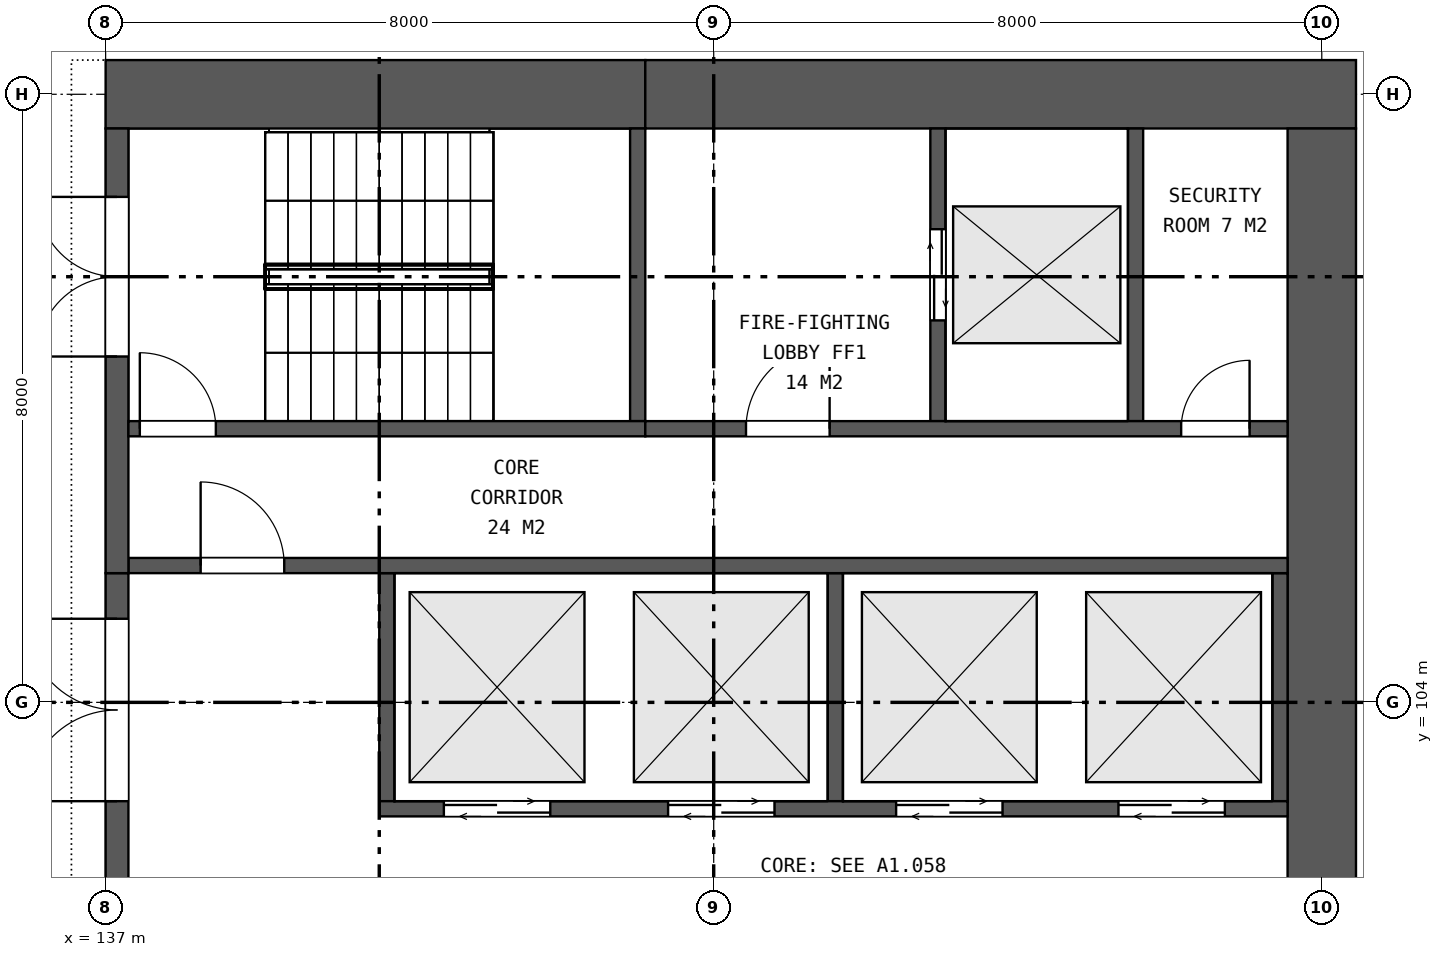
"""IFC4 building model, lengths in metres.
Left out: names, types, materials, properties, quantities, classifications, styles, units other than length and angle.
Written with IfcOpenShell. Run it as: python <this file> out.ifc"""

import sys

from ifc_helpers import new_model, si_unit, direction, frame, frame_2d, origin, place, context, subcontext, project, spatial, rectangle, extrude, element, fill, save


model = new_model("IFC4")
c1 = context("Model", 3, precision=1e-05, world=origin(), true_north=direction((0.0, 1.0)))
c2 = subcontext(c1, "Body", "Model", "MODEL_VIEW")
j1 = project(units=[si_unit("LENGTHUNIT", "METRE"), si_unit("PLANEANGLEUNIT", "RADIAN")], contexts=[c1])
p1 = place(None, origin())
s1 = spatial("IfcSite", under=j1, at=p1, CompositionType="ELEMENT")
p2 = place(p1, origin())
s2 = spatial("IfcBuilding", under=s1, at=p2, CompositionType="ELEMENT")
p3 = place(p2, origin())
s3 = spatial("IfcBuildingStorey", under=s2, at=p3, CompositionType="ELEMENT", Elevation=0.0)
p4 = place(p3, frame((137.0, 112.0, 0.0), z_axis=(0.0, 0.0, 1.0), x_axis=(1.0, 0.0, 0.0)))
e1 = element("IfcWall", 1, at=p4, inside=s3, PredefinedType="SHEAR", context=c2, shape_type="SweptSolid", body=[
    extrude(rectangle(XDim=7.1, YDim=0.9, at=frame_2d((3.55, 0.0))), origin(), (0.0, 0.0, 1.0), 10.0),
])
p5 = place(p3, frame((144.1, 112.0, 0.0), z_axis=(0.0, 0.0, 1.0), x_axis=(1.0, 0.0, 0.0)))
e2 = element("IfcWall", 2, at=p5, inside=s3, PredefinedType="SHEAR", context=c2, shape_type="SweptSolid", body=[
    extrude(rectangle(XDim=9.35, YDim=0.9, at=frame_2d((4.675, 0.0))), origin(), (0.0, 0.0, 1.0), 10.0),
])
p6 = place(p3, frame((153.0, 88.45, 0.0), z_axis=(0.0, 0.0, 1.0), x_axis=(0.0, 1.0, 0.0)))
e3 = element("IfcWall", 3, at=p6, inside=s3, PredefinedType="SHEAR", context=c2, shape_type="SweptSolid", body=[
    extrude(rectangle(XDim=23.1, YDim=0.9, at=frame_2d((11.55, 0.0))), origin(), (0.0, 0.0, 1.0), 10.0),
])
p7 = place(p6, frame((10.35, 0.0, 0.0)))
e4 = element("IfcOpeningElement", 4, at=p7, cuts=e3, PredefinedType="OPENING", context=c2, shape_type="SweptSolid", body=[
    extrude(rectangle(XDim=2.4, YDim=2.4, at=frame_2d((1.2, 1.2))), frame((0.0, 0.46, 0.0), z_axis=(0.0, -1.0, 0.0), x_axis=(1.0, 0.0, 0.0)), (0.0, 0.0, 1.0), 0.92),
])
p8 = place(p3, frame((137.15, 94.3, 0.0), z_axis=(0.0, 0.0, 1.0), x_axis=(0.0, 1.0, 0.0)))
e5 = element("IfcWall", 5, at=p8, inside=s3, PredefinedType="SHEAR", context=c2, shape_type="SweptSolid", body=[
    extrude(rectangle(XDim=11.4, YDim=0.3, at=frame_2d((5.7, 0.0))), origin(), (0.0, 0.0, 1.0), 10.0),
])
p9 = place(p8, frame((0.6, 0.0, 0.0)))
e6 = element("IfcOpeningElement", 6, at=p9, cuts=e5, PredefinedType="OPENING", context=c2, shape_type="SweptSolid", body=[
    extrude(rectangle(XDim=2.4, YDim=2.4, at=frame_2d((1.2, 1.2))), frame((0.0, 0.16, 0.0), z_axis=(0.0, -1.0, 0.0), x_axis=(1.0, 0.0, 0.0)), (0.0, 0.0, 1.0), 0.32),
])
p10 = place(p8, frame((4.5, 0.0, 0.0)))
e7 = element("IfcOpeningElement", 7, at=p10, cuts=e5, PredefinedType="OPENING", context=c2, shape_type="SweptSolid", body=[
    extrude(rectangle(XDim=2.4, YDim=2.4, at=frame_2d((1.2, 1.2))), frame((0.0, 0.16, 0.0), z_axis=(0.0, -1.0, 0.0), x_axis=(1.0, 0.0, 0.0)), (0.0, 0.0, 1.0), 0.32),
])
p11 = place(p8, frame((8.4, 0.0, 0.0)))
e8 = element("IfcOpeningElement", 8, at=p11, cuts=e5, PredefinedType="OPENING", context=c2, shape_type="SweptSolid", body=[
    extrude(rectangle(XDim=2.4, YDim=2.4, at=frame_2d((1.2, 1.2))), frame((0.0, 0.16, 0.0), z_axis=(0.0, -1.0, 0.0), x_axis=(1.0, 0.0, 0.0)), (0.0, 0.0, 1.0), 0.32),
])
for number, where, z_axis, x_axis in (
    (9, (140.7, 102.7, 0.0), (0.0, 0.0, 1.0), (0.0, 1.0, 0.0)),
    (10, (146.6, 102.7, 0.0), (0.0, 0.0, 1.0), (0.0, 1.0, 0.0)),
    (11, (152.45, 102.7, 0.0), (0.0, 0.0, 1.0), (0.0, 1.0, 0.0)),
):
    element("IfcWall", number, at=place(p3, frame(where, z_axis=z_axis, x_axis=x_axis)), inside=s3, PredefinedType="SHEAR", context=c2, shape_type="SweptSolid", body=[
        extrude(rectangle(XDim=3.0, YDim=0.2, at=frame_2d((1.5, 0.0))), origin(), (0.0, 0.0, 1.0), 10.0),
    ])
p12 = place(p3, frame((140.6, 102.6, 0.0), z_axis=(0.0, 0.0, 1.0), x_axis=(1.0, 0.0, 0.0)))
e12 = element("IfcWall", 12, at=p12, inside=s3, PredefinedType="SHEAR", context=c2, shape_type="SweptSolid", body=[
    extrude(rectangle(XDim=11.95, YDim=0.2, at=frame_2d((5.975, 0.0))), origin(), (0.0, 0.0, 1.0), 10.0),
])
p13 = place(p12, frame((0.85, 0.0, 0.0)))
e13 = element("IfcOpeningElement", 13, at=p13, cuts=e12, PredefinedType="OPENING", context=c2, shape_type="SweptSolid", body=[
    extrude(rectangle(XDim=1.4, YDim=2.1, at=frame_2d((0.7, 1.05))), frame((0.0, 0.11, 0.0), z_axis=(0.0, -1.0, 0.0), x_axis=(1.0, 0.0, 0.0)), (0.0, 0.0, 1.0), 0.22),
])
p14 = place(p12, frame((3.8, 0.0, 0.0)))
e14 = element("IfcOpeningElement", 14, at=p14, cuts=e12, PredefinedType="OPENING", context=c2, shape_type="SweptSolid", body=[
    extrude(rectangle(XDim=1.4, YDim=2.1, at=frame_2d((0.7, 1.05))), frame((0.0, 0.11, 0.0), z_axis=(0.0, -1.0, 0.0), x_axis=(1.0, 0.0, 0.0)), (0.0, 0.0, 1.0), 0.22),
])
p15 = place(p12, frame((6.8, 0.0, 0.0)))
e15 = element("IfcOpeningElement", 15, at=p15, cuts=e12, PredefinedType="OPENING", context=c2, shape_type="SweptSolid", body=[
    extrude(rectangle(XDim=1.4, YDim=2.1, at=frame_2d((0.7, 1.05))), frame((0.0, 0.11, 0.0), z_axis=(0.0, -1.0, 0.0), x_axis=(1.0, 0.0, 0.0)), (0.0, 0.0, 1.0), 0.22),
])
p16 = place(p12, frame((9.725, 0.0, 0.0)))
e16 = element("IfcOpeningElement", 16, at=p16, cuts=e12, PredefinedType="OPENING", context=c2, shape_type="SweptSolid", body=[
    extrude(rectangle(XDim=1.4, YDim=2.1, at=frame_2d((0.7, 1.05))), frame((0.0, 0.11, 0.0), z_axis=(0.0, -1.0, 0.0), x_axis=(1.0, 0.0, 0.0)), (0.0, 0.0, 1.0), 0.22),
])
p17 = place(p3, frame((137.3, 105.8, 0.0), z_axis=(0.0, 0.0, 1.0), x_axis=(1.0, 0.0, 0.0)))
e17 = element("IfcWall", 17, at=p17, inside=s3, PredefinedType="SHEAR", context=c2, shape_type="SweptSolid", body=[
    extrude(rectangle(XDim=15.25, YDim=0.2, at=frame_2d((7.625, 0.0))), origin(), (0.0, 0.0, 1.0), 10.0),
])
p18 = place(p17, frame((0.95, 0.0, 0.0)))
e18 = element("IfcOpeningElement", 18, at=p18, cuts=e17, PredefinedType="OPENING", context=c2, shape_type="SweptSolid", body=[
    extrude(rectangle(XDim=1.1, YDim=2.1, at=frame_2d((0.55, 1.05))), frame((0.0, 0.11, 0.0), z_axis=(0.0, -1.0, 0.0), x_axis=(1.0, 0.0, 0.0)), (0.0, 0.0, 1.0), 0.22),
])
p19 = place(p3, frame((137.15, 105.7, 0.0), z_axis=(0.0, 0.0, 1.0), x_axis=(0.0, 1.0, 0.0)))
e19 = element("IfcWall", 19, at=p19, inside=s3, PredefinedType="SHEAR", context=c2, shape_type="SweptSolid", body=[
    extrude(rectangle(XDim=5.85, YDim=0.3, at=frame_2d((2.925, 0.0))), origin(), (0.0, 0.0, 1.0), 10.0),
])
p20 = place(p19, frame((2.85, 0.0, 0.0)))
e20 = element("IfcOpeningElement", 20, at=p20, cuts=e19, PredefinedType="OPENING", context=c2, shape_type="SweptSolid", body=[
    extrude(rectangle(XDim=2.1, YDim=2.4, at=frame_2d((1.05, 1.2))), frame((0.0, 0.16, 0.0), z_axis=(0.0, -1.0, 0.0), x_axis=(1.0, 0.0, 0.0)), (0.0, 0.0, 1.0), 0.32),
])
p21 = place(p3, frame((144.0, 107.7, 0.0), z_axis=(0.0, 0.0, 1.0), x_axis=(0.0, 1.0, 0.0)))
e21 = element("IfcWall", 21, at=p21, inside=s3, PredefinedType="SHEAR", context=c2, shape_type="SweptSolid", body=[
    extrude(rectangle(XDim=3.85, YDim=0.2, at=frame_2d((1.925, 0.0))), origin(), (0.0, 0.0, 1.0), 10.0),
])
p22 = place(p3, frame((147.95, 107.7, 0.0), z_axis=(0.0, 0.0, 1.0), x_axis=(0.0, 1.0, 0.0)))
e22 = element("IfcWall", 22, at=p22, inside=s3, PredefinedType="SHEAR", context=c2, shape_type="SweptSolid", body=[
    extrude(rectangle(XDim=3.85, YDim=0.2, at=frame_2d((1.925, 0.0))), origin(), (0.0, 0.0, 1.0), 10.0),
])
p23 = place(p22, frame((1.325, 0.0, 0.0)))
e23 = element("IfcOpeningElement", 23, at=p23, cuts=e22, PredefinedType="OPENING", context=c2, shape_type="SweptSolid", body=[
    extrude(rectangle(XDim=1.2, YDim=2.1, at=frame_2d((0.6, 1.05))), frame((0.0, 0.11, 0.0), z_axis=(0.0, -1.0, 0.0), x_axis=(1.0, 0.0, 0.0)), (0.0, 0.0, 1.0), 0.22),
])
p24 = place(p3, frame((150.55, 107.7, 0.0), z_axis=(0.0, 0.0, 1.0), x_axis=(0.0, 1.0, 0.0)))
e24 = element("IfcWall", 24, at=p24, inside=s3, PredefinedType="SHEAR", context=c2, shape_type="SweptSolid", body=[
    extrude(rectangle(XDim=3.85, YDim=0.2, at=frame_2d((1.925, 0.0))), origin(), (0.0, 0.0, 1.0), 10.0),
])
p25 = place(p3, frame((137.3, 107.6, 0.0), z_axis=(0.0, 0.0, 1.0), x_axis=(1.0, 0.0, 0.0)))
e25 = element("IfcWall", 25, at=p25, inside=s3, PredefinedType="SHEAR", context=c2, shape_type="SweptSolid", body=[
    extrude(rectangle(XDim=6.8, YDim=0.2, at=frame_2d((3.4, 0.0))), origin(), (0.0, 0.0, 1.0), 10.0),
])
p26 = place(p25, frame((0.15, 0.0, 0.0)))
e26 = element("IfcOpeningElement", 26, at=p26, cuts=e25, PredefinedType="OPENING", context=c2, shape_type="SweptSolid", body=[
    extrude(rectangle(XDim=1.0, YDim=2.1, at=frame_2d((0.5, 1.05))), frame((0.0, 0.11, 0.0), z_axis=(0.0, -1.0, 0.0), x_axis=(1.0, 0.0, 0.0)), (0.0, 0.0, 1.0), 0.22),
])
p27 = place(p3, frame((144.1, 107.6, 0.0), z_axis=(0.0, 0.0, 1.0), x_axis=(1.0, 0.0, 0.0)))
e27 = element("IfcWall", 27, at=p27, inside=s3, PredefinedType="SHEAR", context=c2, shape_type="SweptSolid", body=[
    extrude(rectangle(XDim=8.45, YDim=0.2, at=frame_2d((4.225, 0.0))), origin(), (0.0, 0.0, 1.0), 10.0),
])
p28 = place(p27, frame((1.325, 0.0, 0.0)))
e28 = element("IfcOpeningElement", 28, at=p28, cuts=e27, PredefinedType="OPENING", context=c2, shape_type="SweptSolid", body=[
    extrude(rectangle(XDim=1.1, YDim=2.1, at=frame_2d((0.55, 1.05))), frame((0.0, 0.11, 0.0), z_axis=(0.0, -1.0, 0.0), x_axis=(1.0, 0.0, 0.0)), (0.0, 0.0, 1.0), 0.22),
])
p29 = place(p27, frame((7.05, 0.0, 0.0)))
e29 = element("IfcOpeningElement", 29, at=p29, cuts=e27, PredefinedType="OPENING", context=c2, shape_type="SweptSolid", body=[
    extrude(rectangle(XDim=0.9, YDim=2.1, at=frame_2d((0.45, 1.05))), frame((0.0, 0.11, 0.0), z_axis=(0.0, -1.0, 0.0), x_axis=(1.0, 0.0, 0.0)), (0.0, 0.0, 1.0), 0.22),
])
p30 = place(p11, origin())
e30 = element("IfcDoor", 30, at=p30, inside=s3, OperationType="DOUBLE_DOOR_SINGLE_SWING", PredefinedType="DOOR", context=c2, shape_type="SweptSolid", body=[
    extrude(rectangle(XDim=2.4, YDim=2.4, at=frame_2d((1.2, 1.2))), frame((0.0, 0.025, 0.0), z_axis=(0.0, -1.0, 0.0), x_axis=(1.0, 0.0, 0.0)), (0.0, 0.0, 1.0), 0.05),
])
fill(e8, e30)
p31 = place(p13, origin())
e31 = element("IfcDoor", 31, at=p31, inside=s3, OperationType="DOUBLE_DOOR_SLIDING", PredefinedType="DOOR", context=c2, shape_type="SweptSolid", body=[
    extrude(rectangle(XDim=1.4, YDim=2.1, at=frame_2d((0.7, 1.05))), frame((0.0, 0.025, 0.0), z_axis=(0.0, -1.0, 0.0), x_axis=(1.0, 0.0, 0.0)), (0.0, 0.0, 1.0), 0.05),
])
fill(e13, e31)
p32 = place(p14, origin())
e32 = element("IfcDoor", 32, at=p32, inside=s3, OperationType="DOUBLE_DOOR_SLIDING", PredefinedType="DOOR", context=c2, shape_type="SweptSolid", body=[
    extrude(rectangle(XDim=1.4, YDim=2.1, at=frame_2d((0.7, 1.05))), frame((0.0, 0.025, 0.0), z_axis=(0.0, -1.0, 0.0), x_axis=(1.0, 0.0, 0.0)), (0.0, 0.0, 1.0), 0.05),
])
fill(e14, e32)
p33 = place(p15, origin())
e33 = element("IfcDoor", 33, at=p33, inside=s3, OperationType="DOUBLE_DOOR_SLIDING", PredefinedType="DOOR", context=c2, shape_type="SweptSolid", body=[
    extrude(rectangle(XDim=1.4, YDim=2.1, at=frame_2d((0.7, 1.05))), frame((0.0, 0.025, 0.0), z_axis=(0.0, -1.0, 0.0), x_axis=(1.0, 0.0, 0.0)), (0.0, 0.0, 1.0), 0.05),
])
fill(e15, e33)
p34 = place(p16, origin())
e34 = element("IfcDoor", 34, at=p34, inside=s3, OperationType="DOUBLE_DOOR_SLIDING", PredefinedType="DOOR", context=c2, shape_type="SweptSolid", body=[
    extrude(rectangle(XDim=1.4, YDim=2.1, at=frame_2d((0.7, 1.05))), frame((0.0, 0.025, 0.0), z_axis=(0.0, -1.0, 0.0), x_axis=(1.0, 0.0, 0.0)), (0.0, 0.0, 1.0), 0.05),
])
fill(e16, e34)
p35 = place(p18, origin())
e35 = element("IfcDoor", 35, at=p35, inside=s3, OperationType="SINGLE_SWING_LEFT", PredefinedType="DOOR", context=c2, shape_type="SweptSolid", body=[
    extrude(rectangle(XDim=1.1, YDim=2.1, at=frame_2d((0.55, 1.05))), frame((0.0, 0.025, 0.0), z_axis=(0.0, -1.0, 0.0), x_axis=(1.0, 0.0, 0.0)), (0.0, 0.0, 1.0), 0.05),
])
fill(e18, e35)
p36 = place(p20, origin())
e36 = element("IfcDoor", 36, at=p36, inside=s3, OperationType="DOUBLE_DOOR_SINGLE_SWING", PredefinedType="DOOR", context=c2, shape_type="SweptSolid", body=[
    extrude(rectangle(XDim=2.1, YDim=2.4, at=frame_2d((1.05, 1.2))), frame((0.0, 0.025, 0.0), z_axis=(0.0, -1.0, 0.0), x_axis=(1.0, 0.0, 0.0)), (0.0, 0.0, 1.0), 0.05),
])
fill(e20, e36)
p37 = place(p23, origin())
e37 = element("IfcDoor", 37, at=p37, inside=s3, OperationType="DOUBLE_DOOR_SLIDING", PredefinedType="DOOR", context=c2, shape_type="SweptSolid", body=[
    extrude(rectangle(XDim=1.2, YDim=2.1, at=frame_2d((0.6, 1.05))), frame((0.0, 0.025, 0.0), z_axis=(0.0, -1.0, 0.0), x_axis=(1.0, 0.0, 0.0)), (0.0, 0.0, 1.0), 0.05),
])
fill(e23, e37)
p38 = place(p26, origin())
e38 = element("IfcDoor", 38, at=p38, inside=s3, OperationType="SINGLE_SWING_LEFT", PredefinedType="DOOR", context=c2, shape_type="SweptSolid", body=[
    extrude(rectangle(XDim=1.0, YDim=2.1, at=frame_2d((0.5, 1.05))), frame((0.0, 0.025, 0.0), z_axis=(0.0, -1.0, 0.0), x_axis=(1.0, 0.0, 0.0)), (0.0, 0.0, 1.0), 0.05),
])
fill(e26, e38)
p39 = place(p28, origin())
e39 = element("IfcDoor", 39, at=p39, inside=s3, OperationType="SINGLE_SWING_RIGHT", PredefinedType="DOOR", context=c2, shape_type="SweptSolid", body=[
    extrude(rectangle(XDim=1.1, YDim=2.1, at=frame_2d((0.55, 1.05))), frame((0.0, 0.025, 0.0), z_axis=(0.0, -1.0, 0.0), x_axis=(1.0, 0.0, 0.0)), (0.0, 0.0, 1.0), 0.05),
])
fill(e28, e39)
p40 = place(p29, origin())
e40 = element("IfcDoor", 40, at=p40, inside=s3, OperationType="SINGLE_SWING_RIGHT", PredefinedType="DOOR", context=c2, shape_type="SweptSolid", body=[
    extrude(rectangle(XDim=0.9, YDim=2.1, at=frame_2d((0.45, 1.05))), frame((0.0, 0.025, 0.0), z_axis=(0.0, -1.0, 0.0), x_axis=(1.0, 0.0, 0.0)), (0.0, 0.0, 1.0), 0.05),
])
fill(e29, e40)
save(model, sys.argv[1])
